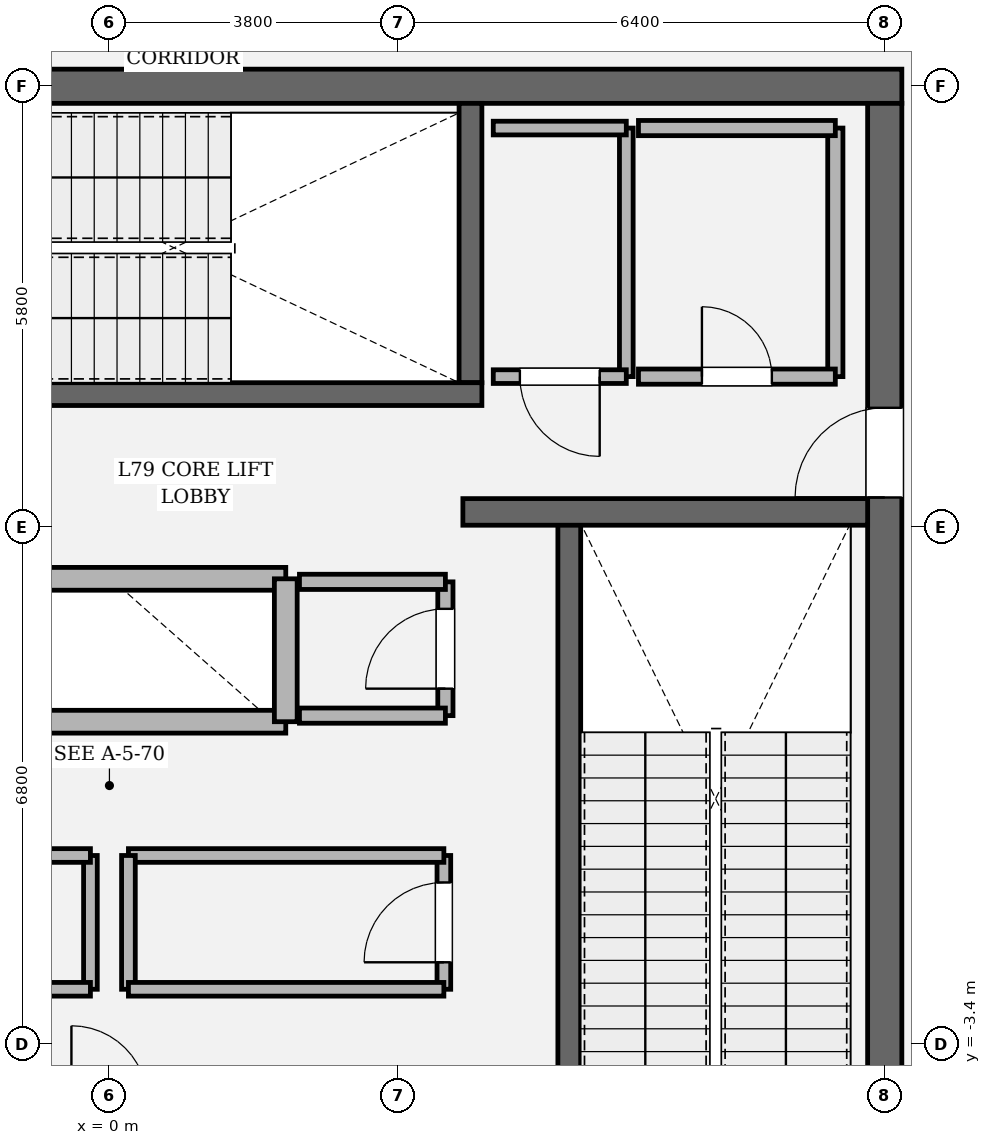
"""IFC4 building model, lengths in metres.
Left out: names, types, materials, properties, quantities, classifications, styles, units other than length and angle.
Written with IfcOpenShell. Run it as: python <this file> out.ifc"""

import sys

from ifc_helpers import new_model, si_unit, direction, frame, frame_2d, origin, place, context, subcontext, project, spatial, rectangle, extrude, element, fill, save


model = new_model("IFC4")
c1 = context("Model", 3, precision=1e-05, world=origin(), true_north=direction((0.0, 1.0)))
c2 = subcontext(c1, "Body", "Model", "MODEL_VIEW")
j1 = project(units=[si_unit("LENGTHUNIT", "METRE"), si_unit("PLANEANGLEUNIT", "RADIAN")], contexts=[c1])
p1 = place(None, origin())
s1 = spatial("IfcSite", under=j1, at=p1, CompositionType="ELEMENT")
p2 = place(p1, origin())
s2 = spatial("IfcBuilding", under=s1, at=p2, CompositionType="ELEMENT")
p3 = place(p2, frame((0.0, 0.0, 334.2)))
s3 = spatial("IfcBuildingStorey", under=s2, at=p3, CompositionType="ELEMENT", Elevation=334.2)
p4 = place(p3, frame((-10.425, 9.2, 0.0), z_axis=(0.0, 0.0, 1.0), x_axis=(1.0, 0.0, 0.0)))
e1 = element("IfcWall", 1, at=p4, inside=s3, PredefinedType="SHEAR", context=c2, shape_type="SweptSolid", body=[
    extrude(rectangle(XDim=20.85, YDim=0.45, at=frame_2d((10.425, 0.0))), origin(), (0.0, 0.0, 1.0), 4.8),
])
p5 = place(p3, frame((10.2, 8.975, 0.0), z_axis=(0.0, 0.0, 1.0), x_axis=(0.0, -1.0, 0.0)))
e2 = element("IfcWall", 2, at=p5, inside=s3, PredefinedType="SHEAR", context=c2, shape_type="SweptSolid", body=[
    extrude(rectangle(XDim=17.95, YDim=0.45, at=frame_2d((8.975, 0.0))), origin(), (0.0, 0.0, 1.0), 4.8),
])
p6 = place(p5, frame((4.005, 0.0, 0.0)))
e3 = element("IfcOpeningElement", 3, at=p6, cuts=e2, PredefinedType="OPENING", context=c2, shape_type="SweptSolid", body=[
    extrude(rectangle(XDim=1.18, YDim=2.2, at=frame_2d((0.59, 1.1))), frame((0.0, 0.235, 0.0), z_axis=(0.0, -1.0, 0.0), x_axis=(1.0, 0.0, 0.0)), (0.0, 0.0, 1.0), 0.47),
])
p7 = place(p3, frame((6.05, 3.45, 0.0), z_axis=(0.0, 0.0, 1.0), x_axis=(0.0, -1.0, 0.0)))
e4 = element("IfcWall", 4, at=p7, inside=s3, PredefinedType="SOLIDWALL", context=c2, shape_type="SweptSolid", body=[
    extrude(rectangle(XDim=8.95, YDim=0.3, at=frame_2d((4.475, 0.0))), origin(), (0.0, 0.0, 1.0), 4.8),
])
p8 = place(p3, frame((4.75, 8.975, 0.0), z_axis=(0.0, 0.0, 1.0), x_axis=(0.0, -1.0, 0.0)))
e5 = element("IfcWall", 5, at=p8, inside=s3, PredefinedType="SOLIDWALL", context=c2, shape_type="SweptSolid", body=[
    extrude(rectangle(XDim=3.675, YDim=0.3, at=frame_2d((1.837, 0.0))), origin(), (0.0, 0.0, 1.0), 4.8),
])
p9 = place(p3, frame((-4.9, 5.15, 0.0), z_axis=(0.0, 0.0, 1.0), x_axis=(1.0, 0.0, 0.0)))
e6 = element("IfcWall", 6, at=p9, inside=s3, PredefinedType="SOLIDWALL", context=c2, shape_type="SweptSolid", body=[
    extrude(rectangle(XDim=9.8, YDim=0.3, at=frame_2d((4.9, 0.0))), origin(), (0.0, 0.0, 1.0), 4.8),
])
p10 = place(p9, frame((0.56, 0.0, 0.0)))
e7 = element("IfcOpeningElement", 7, at=p10, cuts=e6, PredefinedType="OPENING", context=c2, shape_type="SweptSolid", body=[
    extrude(rectangle(XDim=1.18, YDim=2.2, at=frame_2d((0.59, 1.1))), frame((0.0, 0.16, 0.0), z_axis=(0.0, -1.0, 0.0), x_axis=(1.0, 0.0, 0.0)), (0.0, 0.0, 1.0), 0.32),
])
p11 = place(p3, frame((4.65, 3.6, 0.0), z_axis=(0.0, 0.0, 1.0), x_axis=(1.0, 0.0, 0.0)))
e8 = element("IfcWall", 8, at=p11, inside=s3, PredefinedType="SOLIDWALL", context=c2, shape_type="SweptSolid", body=[
    extrude(rectangle(XDim=5.325, YDim=0.35, at=frame_2d((2.663, 0.0))), origin(), (0.0, 0.0, 1.0), 4.8),
])
for number, where, z_axis, x_axis in (
    (9, (-2.32, 0.84, 0.0), (0.0, 0.0, 1.0), (1.0, 0.0, 0.0)),
    (10, (-2.32, 2.72, 0.0), (0.0, 0.0, 1.0), (1.0, 0.0, 0.0)),
):
    element("IfcWall", number, at=place(p3, frame(where, z_axis=z_axis, x_axis=x_axis)), inside=s3, PredefinedType="SOLIDWALL", context=c2, shape_type="SweptSolid", body=[
        extrude(rectangle(XDim=4.64, YDim=0.3, at=frame_2d((2.32, 0.0))), origin(), (0.0, 0.0, 1.0), 4.54),
    ])
p12 = place(p3, frame((2.32, 0.84, 0.0), z_axis=(0.0, 0.0, 1.0), x_axis=(0.0, 1.0, 0.0)))
e11 = element("IfcWall", 11, at=p12, inside=s3, PredefinedType="SOLIDWALL", context=c2, shape_type="SweptSolid", body=[
    extrude(rectangle(XDim=1.88, YDim=0.3, at=frame_2d((0.94, 0.0))), origin(), (0.0, 0.0, 1.0), 4.54),
])
p13 = place(p3, frame((-0.25, -2.68, 0.0), z_axis=(0.0, 0.0, 1.0), x_axis=(0.0, 1.0, 0.0)))
e12 = element("IfcWall", 12, at=p13, inside=s3, PredefinedType="PARTITIONING", context=c2, shape_type="SweptSolid", body=[
    extrude(rectangle(XDim=1.76, YDim=0.18, at=frame_2d((0.88, 0.0))), origin(), (0.0, 0.0, 1.0), 4.54),
])
p14 = place(p3, frame((-0.25, -0.92, 0.0), z_axis=(0.0, 0.0, 1.0), x_axis=(-1.0, 0.0, 0.0)))
e13 = element("IfcWall", 13, at=p14, inside=s3, PredefinedType="PARTITIONING", context=c2, shape_type="SweptSolid", body=[
    extrude(rectangle(XDim=4.15, YDim=0.18, at=frame_2d((2.075, 0.0))), origin(), (0.0, 0.0, 1.0), 4.54),
])
p15 = place(p14, frame((1.55, 0.0, 0.0)))
e14 = element("IfcOpeningElement", 14, at=p15, cuts=e13, PredefinedType="OPENING", context=c2, shape_type="SweptSolid", body=[
    extrude(rectangle(XDim=1.05, YDim=2.2, at=frame_2d((0.525, 1.1))), frame((0.0, 0.1, 0.0), z_axis=(0.0, -1.0, 0.0), x_axis=(1.0, 0.0, 0.0)), (0.0, 0.0, 1.0), 0.2),
])
p16 = place(p3, frame((-4.4, -2.68, 0.0), z_axis=(0.0, 0.0, 1.0), x_axis=(1.0, 0.0, 0.0)))
e15 = element("IfcWall", 15, at=p16, inside=s3, PredefinedType="PARTITIONING", context=c2, shape_type="SweptSolid", body=[
    extrude(rectangle(XDim=4.15, YDim=0.18, at=frame_2d((2.075, 0.0))), origin(), (0.0, 0.0, 1.0), 4.54),
])
p17 = place(p3, frame((4.4, -2.68, 0.0), z_axis=(0.0, 0.0, 1.0), x_axis=(0.0, 1.0, 0.0)))
e16 = element("IfcWall", 16, at=p17, inside=s3, PredefinedType="PARTITIONING", context=c2, shape_type="SweptSolid", body=[
    extrude(rectangle(XDim=1.76, YDim=0.18, at=frame_2d((0.88, 0.0))), origin(), (0.0, 0.0, 1.0), 4.54),
])
p18 = place(p17, frame((0.355, 0.0, 0.0)))
e17 = element("IfcOpeningElement", 17, at=p18, cuts=e16, PredefinedType="OPENING", context=c2, shape_type="SweptSolid", body=[
    extrude(rectangle(XDim=1.05, YDim=2.2, at=frame_2d((0.525, 1.1))), frame((0.0, 0.1, 0.0), z_axis=(0.0, -1.0, 0.0), x_axis=(1.0, 0.0, 0.0)), (0.0, 0.0, 1.0), 0.2),
])
p19 = place(p3, frame((4.4, -0.92, 0.0), z_axis=(0.0, 0.0, 1.0), x_axis=(-1.0, 0.0, 0.0)))
e18 = element("IfcWall", 18, at=p19, inside=s3, PredefinedType="PARTITIONING", context=c2, shape_type="SweptSolid", body=[
    extrude(rectangle(XDim=4.15, YDim=0.18, at=frame_2d((2.075, 0.0))), origin(), (0.0, 0.0, 1.0), 4.54),
])
p20 = place(p3, frame((0.25, -0.92, 0.0), z_axis=(0.0, 0.0, 1.0), x_axis=(0.0, -1.0, 0.0)))
e19 = element("IfcWall", 19, at=p20, inside=s3, PredefinedType="PARTITIONING", context=c2, shape_type="SweptSolid", body=[
    extrude(rectangle(XDim=1.76, YDim=0.18, at=frame_2d((0.88, 0.0))), origin(), (0.0, 0.0, 1.0), 4.54),
])
p21 = place(p3, frame((0.25, -2.68, 0.0), z_axis=(0.0, 0.0, 1.0), x_axis=(1.0, 0.0, 0.0)))
e20 = element("IfcWall", 20, at=p21, inside=s3, PredefinedType="PARTITIONING", context=c2, shape_type="SweptSolid", body=[
    extrude(rectangle(XDim=4.15, YDim=0.18, at=frame_2d((2.075, 0.0))), origin(), (0.0, 0.0, 1.0), 4.54),
])
p22 = place(p3, frame((4.42, 0.92, 0.0), z_axis=(0.0, 0.0, 1.0), x_axis=(0.0, 1.0, 0.0)))
e21 = element("IfcWall", 21, at=p22, inside=s3, PredefinedType="SOLIDWALL", context=c2, shape_type="SweptSolid", body=[
    extrude(rectangle(XDim=1.76, YDim=0.2, at=frame_2d((0.88, 0.0))), origin(), (0.0, 0.0, 1.0), 4.54),
])
p23 = place(p22, frame((0.355, 0.0, 0.0)))
e22 = element("IfcOpeningElement", 22, at=p23, cuts=e21, PredefinedType="OPENING", context=c2, shape_type="SweptSolid", body=[
    extrude(rectangle(XDim=1.05, YDim=2.2, at=frame_2d((0.525, 1.1))), frame((0.0, 0.11, 0.0), z_axis=(0.0, -1.0, 0.0), x_axis=(1.0, 0.0, 0.0)), (0.0, 0.0, 1.0), 0.22),
])
for number, where, z_axis, x_axis in (
    (23, (4.42, 2.68, 0.0), (0.0, 0.0, 1.0), (-1.0, 0.0, 0.0)),
    (24, (2.5, 0.92, 0.0), (0.0, 0.0, 1.0), (1.0, 0.0, 0.0)),
):
    element("IfcWall", number, at=place(p3, frame(where, z_axis=z_axis, x_axis=x_axis)), inside=s3, PredefinedType="SOLIDWALL", context=c2, shape_type="SweptSolid", body=[
        extrude(rectangle(XDim=1.92, YDim=0.2, at=frame_2d((0.96, 0.0))), origin(), (0.0, 0.0, 1.0), 4.54),
    ])
p24 = place(p3, frame((6.8, 5.38, 0.0), z_axis=(0.0, 0.0, 1.0), x_axis=(0.0, 1.0, 0.0)))
e25 = element("IfcWall", 25, at=p24, inside=s3, PredefinedType="PARTITIONING", context=c2, shape_type="SweptSolid", body=[
    extrude(rectangle(XDim=3.27, YDim=0.18, at=frame_2d((1.635, 0.0))), origin(), (0.0, 0.0, 1.0), 4.54),
])
p25 = place(p3, frame((6.8, 8.65, 0.0), z_axis=(0.0, 0.0, 1.0), x_axis=(-1.0, 0.0, 0.0)))
e26 = element("IfcWall", 26, at=p25, inside=s3, PredefinedType="PARTITIONING", context=c2, shape_type="SweptSolid", body=[
    extrude(rectangle(XDim=1.75, YDim=0.18, at=frame_2d((0.875, 0.0))), origin(), (0.0, 0.0, 1.0), 4.54),
])
p26 = place(p3, frame((5.05, 5.38, 0.0), z_axis=(0.0, 0.0, 1.0), x_axis=(1.0, 0.0, 0.0)))
e27 = element("IfcWall", 27, at=p26, inside=s3, PredefinedType="PARTITIONING", context=c2, shape_type="SweptSolid", body=[
    extrude(rectangle(XDim=1.75, YDim=0.18, at=frame_2d((0.875, 0.0))), origin(), (0.0, 0.0, 1.0), 4.54),
])
p27 = place(p26, frame((0.35, 0.0, 0.0)))
e28 = element("IfcOpeningElement", 28, at=p27, cuts=e27, PredefinedType="OPENING", context=c2, shape_type="SweptSolid", body=[
    extrude(rectangle(XDim=1.05, YDim=2.2, at=frame_2d((0.525, 1.1))), frame((0.0, 0.1, 0.0), z_axis=(0.0, -1.0, 0.0), x_axis=(1.0, 0.0, 0.0)), (0.0, 0.0, 1.0), 0.2),
])
p28 = place(p3, frame((9.55, 5.38, 0.0), z_axis=(0.0, 0.0, 1.0), x_axis=(0.0, 1.0, 0.0)))
e29 = element("IfcWall", 29, at=p28, inside=s3, PredefinedType="SOLIDWALL", context=c2, shape_type="SweptSolid", body=[
    extrude(rectangle(XDim=3.27, YDim=0.2, at=frame_2d((1.635, 0.0))), origin(), (0.0, 0.0, 1.0), 4.54),
])
p29 = place(p3, frame((9.55, 8.65, 0.0), z_axis=(0.0, 0.0, 1.0), x_axis=(-1.0, 0.0, 0.0)))
e30 = element("IfcWall", 30, at=p29, inside=s3, PredefinedType="SOLIDWALL", context=c2, shape_type="SweptSolid", body=[
    extrude(rectangle(XDim=2.59, YDim=0.2, at=frame_2d((1.295, 0.0))), origin(), (0.0, 0.0, 1.0), 4.54),
])
p30 = place(p3, frame((6.96, 5.38, 0.0), z_axis=(0.0, 0.0, 1.0), x_axis=(1.0, 0.0, 0.0)))
e31 = element("IfcWall", 31, at=p30, inside=s3, PredefinedType="SOLIDWALL", context=c2, shape_type="SweptSolid", body=[
    extrude(rectangle(XDim=2.59, YDim=0.2, at=frame_2d((1.295, 0.0))), origin(), (0.0, 0.0, 1.0), 4.54),
])
p31 = place(p30, frame((0.835, 0.0, 0.0)))
e32 = element("IfcOpeningElement", 32, at=p31, cuts=e31, PredefinedType="OPENING", context=c2, shape_type="SweptSolid", body=[
    extrude(rectangle(XDim=0.92, YDim=2.1, at=frame_2d((0.46, 1.05))), frame((0.0, 0.11, 0.0), z_axis=(0.0, -1.0, 0.0), x_axis=(1.0, 0.0, 0.0)), (0.0, 0.0, 1.0), 0.22),
])
p32 = place(p6, origin())
e33 = element("IfcDoor", 33, at=p32, inside=s3, OperationType="SINGLE_SWING_RIGHT", PredefinedType="DOOR", context=c2, shape_type="SweptSolid", body=[
    extrude(rectangle(XDim=1.18, YDim=2.2, at=frame_2d((0.59, 1.1))), frame((0.0, 0.025, 0.0), z_axis=(0.0, -1.0, 0.0), x_axis=(1.0, 0.0, 0.0)), (0.0, 0.0, 1.0), 0.05),
])
fill(e3, e33)
p33 = place(p18, origin())
e34 = element("IfcDoor", 34, at=p33, inside=s3, OperationType="SINGLE_SWING_LEFT", PredefinedType="DOOR", context=c2, shape_type="SweptSolid", body=[
    extrude(rectangle(XDim=1.05, YDim=2.2, at=frame_2d((0.525, 1.1))), frame((0.0, 0.025, 0.0), z_axis=(0.0, -1.0, 0.0), x_axis=(1.0, 0.0, 0.0)), (0.0, 0.0, 1.0), 0.05),
])
fill(e17, e34)
p34 = place(p23, origin())
e35 = element("IfcDoor", 35, at=p34, inside=s3, OperationType="SINGLE_SWING_LEFT", PredefinedType="DOOR", context=c2, shape_type="SweptSolid", body=[
    extrude(rectangle(XDim=1.05, YDim=2.2, at=frame_2d((0.525, 1.1))), frame((0.0, 0.025, 0.0), z_axis=(0.0, -1.0, 0.0), x_axis=(1.0, 0.0, 0.0)), (0.0, 0.0, 1.0), 0.05),
])
fill(e22, e35)
p35 = place(p27, origin())
e36 = element("IfcDoor", 36, at=p35, inside=s3, OperationType="SINGLE_SWING_RIGHT", PredefinedType="DOOR", context=c2, shape_type="SweptSolid", body=[
    extrude(rectangle(XDim=1.05, YDim=2.2, at=frame_2d((0.525, 1.1))), frame((0.0, 0.025, 0.0), z_axis=(0.0, -1.0, 0.0), x_axis=(1.0, 0.0, 0.0)), (0.0, 0.0, 1.0), 0.05),
])
fill(e28, e36)
p36 = place(p31, origin())
e37 = element("IfcDoor", 37, at=p36, inside=s3, OperationType="SINGLE_SWING_LEFT", PredefinedType="DOOR", context=c2, shape_type="SweptSolid", body=[
    extrude(rectangle(XDim=0.92, YDim=2.1, at=frame_2d((0.46, 1.05))), frame((0.0, 0.025, 0.0), z_axis=(0.0, -1.0, 0.0), x_axis=(1.0, 0.0, 0.0)), (0.0, 0.0, 1.0), 0.05),
])
fill(e32, e37)
save(model, sys.argv[1])
